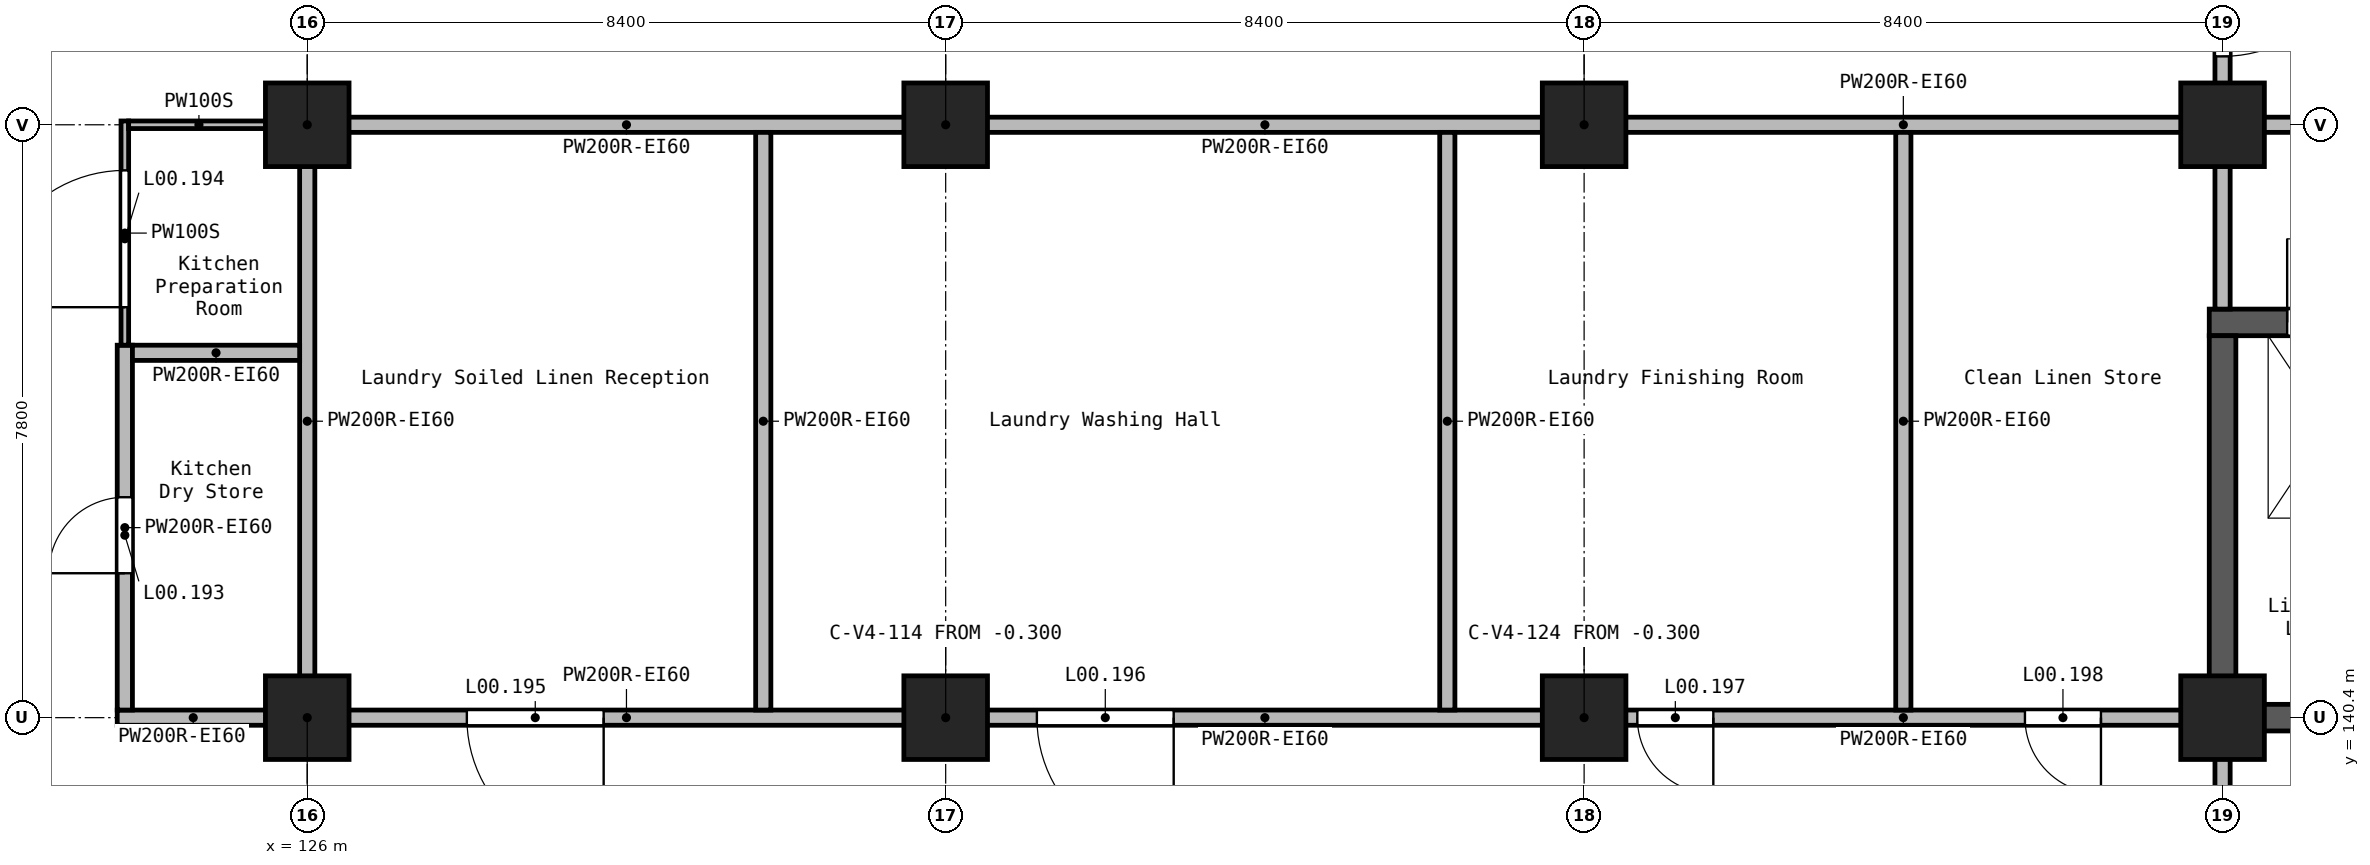
"""IFC4 building model, lengths in metres.
Left out: names, types, materials, properties, quantities, classifications, styles, units other than length and angle.
Written with IfcOpenShell. Run it as: python <this file> out.ifc"""

import sys

from ifc_helpers import new_model, si_unit, direction, frame, frame_2d, origin, origin_2d, place, context, subcontext, project, spatial, rectangle, extrude, element, fill, save


model = new_model("IFC4")
c1 = context("Model", 3, precision=1e-05, world=origin(), true_north=direction((0.0, 1.0)))
c2 = subcontext(c1, "Body", "Model", "MODEL_VIEW")
j1 = project(units=[si_unit("LENGTHUNIT", "METRE"), si_unit("PLANEANGLEUNIT", "RADIAN")], contexts=[c1])
p1 = place(None, origin())
s1 = spatial("IfcSite", under=j1, at=p1, CompositionType="ELEMENT")
p2 = place(p1, origin())
s2 = spatial("IfcBuilding", under=s1, at=p2, CompositionType="ELEMENT")
p3 = place(p2, origin())
s3 = spatial("IfcBuildingStorey", under=s2, at=p3, CompositionType="ELEMENT", Elevation=0.0)
for number, where, z_axis, x_axis in (
    (1, (126.0, 140.4, -0.3), (0.0, 0.0, 1.0), (1.0, 0.0, 0.0)),
    (2, (126.0, 148.2, -0.3), (0.0, 0.0, 1.0), (1.0, 0.0, 0.0)),
    (3, (134.4, 140.4, -0.3), (0.0, 0.0, 1.0), (1.0, 0.0, 0.0)),
    (4, (134.4, 148.2, -0.3), (0.0, 0.0, 1.0), (1.0, 0.0, 0.0)),
    (5, (142.8, 140.4, -0.3), (0.0, 0.0, 1.0), (1.0, 0.0, 0.0)),
    (6, (142.8, 148.2, -0.3), (0.0, 0.0, 1.0), (1.0, 0.0, 0.0)),
    (7, (151.2, 140.4, -0.3), (0.0, 0.0, 1.0), (1.0, 0.0, 0.0)),
    (8, (151.2, 148.2, -0.3), (0.0, 0.0, 1.0), (1.0, 0.0, 0.0)),
):
    element("IfcColumn", number, at=place(p3, frame(where, z_axis=z_axis, x_axis=x_axis)), inside=s3, PredefinedType="COLUMN", context=c2, shape_type="SweptSolid", body=[
        extrude(rectangle(XDim=1.1, YDim=1.1, at=origin_2d()), origin(), (0.0, 0.0, 1.0), 5.7),
    ])
p4 = place(p3, frame((151.025, 145.6, -0.3), z_axis=(0.0, 0.0, 1.0), x_axis=(1.0, 0.0, 0.0)))
e9 = element("IfcWall", 9, at=p4, inside=s3, PredefinedType="SHEAR", context=c2, shape_type="SweptSolid", body=[
    extrude(rectangle(XDim=2.975, YDim=0.35, at=frame_2d((1.488, 0.0))), origin(), (0.0, 0.0, 1.0), 5.7),
])
p5 = place(p4, frame((1.025, 0.0, 0.3)))
e10 = element("IfcOpeningElement", 10, at=p5, cuts=e9, PredefinedType="OPENING", context=c2, shape_type="SweptSolid", body=[
    extrude(rectangle(XDim=1.1, YDim=2.1, at=frame_2d((0.55, 1.05))), frame((0.0, 0.185, 0.0), z_axis=(0.0, -1.0, 0.0), x_axis=(1.0, 0.0, 0.0)), (0.0, 0.0, 1.0), 0.37),
])
p6 = place(p3, frame((151.2, 140.225, -0.3), z_axis=(0.0, 0.0, 1.0), x_axis=(0.0, 1.0, 0.0)))
e11 = element("IfcWall", 11, at=p6, inside=s3, PredefinedType="SHEAR", context=c2, shape_type="SweptSolid", body=[
    extrude(rectangle(XDim=5.2, YDim=0.35, at=frame_2d((2.6, 0.0))), origin(), (0.0, 0.0, 1.0), 5.7),
])
p7 = place(p3, frame((151.375, 140.4, -0.3), z_axis=(0.0, 0.0, 1.0), x_axis=(1.0, 0.0, 0.0)))
e12 = element("IfcWall", 12, at=p7, inside=s3, PredefinedType="SHEAR", context=c2, shape_type="SweptSolid", body=[
    extrude(rectangle(XDim=2.625, YDim=0.35, at=frame_2d((1.312, 0.0))), origin(), (0.0, 0.0, 1.0), 5.7),
])
p8 = place(p3, frame((150.7, 140.4, 0.0), z_axis=(0.0, 0.0, 1.0), x_axis=(-1.0, 0.0, 0.0)))
e13 = element("IfcWall", 13, at=p8, inside=s3, PredefinedType="SOLIDWALL", context=c2, shape_type="SweptSolid", body=[
    extrude(rectangle(XDim=7.4, YDim=0.2, at=frame_2d((3.7, 0.0))), origin(), (0.0, 0.0, 1.0), 5.05),
])
p9 = place(p8, frame((6.2, 0.0, 0.0)))
e14 = element("IfcOpeningElement", 14, at=p9, cuts=e13, PredefinedType="OPENING", context=c2, shape_type="SweptSolid", body=[
    extrude(rectangle(XDim=1.0, YDim=2.1, at=frame_2d((0.5, 1.05))), frame((0.0, 0.11, 0.0), z_axis=(0.0, -1.0, 0.0), x_axis=(1.0, 0.0, 0.0)), (0.0, 0.0, 1.0), 0.22),
])
p10 = place(p8, frame((1.1, 0.0, 0.0)))
e15 = element("IfcOpeningElement", 15, at=p10, cuts=e13, PredefinedType="OPENING", context=c2, shape_type="SweptSolid", body=[
    extrude(rectangle(XDim=1.0, YDim=2.1, at=frame_2d((0.5, 1.05))), frame((0.0, 0.11, 0.0), z_axis=(0.0, -1.0, 0.0), x_axis=(1.0, 0.0, 0.0)), (0.0, 0.0, 1.0), 0.22),
])
p11 = place(p3, frame((142.3, 140.4, 0.0), z_axis=(0.0, 0.0, 1.0), x_axis=(-1.0, 0.0, 0.0)))
e16 = element("IfcWall", 16, at=p11, inside=s3, PredefinedType="SOLIDWALL", context=c2, shape_type="SweptSolid", body=[
    extrude(rectangle(XDim=7.4, YDim=0.2, at=frame_2d((3.7, 0.0))), origin(), (0.0, 0.0, 1.0), 5.05),
])
p12 = place(p11, frame((4.9, 0.0, 0.0)))
e17 = element("IfcOpeningElement", 17, at=p12, cuts=e16, PredefinedType="OPENING", context=c2, shape_type="SweptSolid", body=[
    extrude(rectangle(XDim=1.8, YDim=2.1, at=frame_2d((0.9, 1.05))), frame((0.0, 0.11, 0.0), z_axis=(0.0, -1.0, 0.0), x_axis=(1.0, 0.0, 0.0)), (0.0, 0.0, 1.0), 0.22),
])
p13 = place(p3, frame((133.9, 140.4, 0.0), z_axis=(0.0, 0.0, 1.0), x_axis=(-1.0, 0.0, 0.0)))
e18 = element("IfcWall", 18, at=p13, inside=s3, PredefinedType="SOLIDWALL", context=c2, shape_type="SweptSolid", body=[
    extrude(rectangle(XDim=7.4, YDim=0.2, at=frame_2d((3.7, 0.0))), origin(), (0.0, 0.0, 1.0), 5.05),
])
p14 = place(p13, frame((4.0, 0.0, 0.0)))
e19 = element("IfcOpeningElement", 19, at=p14, cuts=e18, PredefinedType="OPENING", context=c2, shape_type="SweptSolid", body=[
    extrude(rectangle(XDim=1.8, YDim=2.1, at=frame_2d((0.9, 1.05))), frame((0.0, 0.11, 0.0), z_axis=(0.0, -1.0, 0.0), x_axis=(1.0, 0.0, 0.0)), (0.0, 0.0, 1.0), 0.22),
])
p15 = place(p3, frame((125.5, 140.4, 0.0), z_axis=(0.0, 0.0, 1.0), x_axis=(-1.0, 0.0, 0.0)))
e20 = element("IfcWall", 20, at=p15, inside=s3, PredefinedType="SOLIDWALL", context=c2, shape_type="SweptSolid", body=[
    extrude(rectangle(XDim=2.0, YDim=0.2, at=frame_2d((1.0, 0.0))), origin(), (0.0, 0.0, 1.0), 5.05),
])
p16 = place(p3, frame((151.2, 151.3, 0.0), z_axis=(0.0, 0.0, 1.0), x_axis=(0.0, -1.0, 0.0)))
e21 = element("IfcWall", 21, at=p16, inside=s3, PredefinedType="SOLIDWALL", context=c2, shape_type="SweptSolid", body=[
    extrude(rectangle(XDim=2.6, YDim=0.2, at=frame_2d((1.3, 0.0))), origin(), (0.0, 0.0, 1.0), 5.05),
])
p17 = place(p16, frame((0.4, 0.0, 0.0)))
e22 = element("IfcOpeningElement", 22, at=p17, cuts=e21, PredefinedType="OPENING", context=c2, shape_type="SweptSolid", body=[
    extrude(rectangle(XDim=1.8, YDim=2.1, at=frame_2d((0.9, 1.05))), frame((0.0, 0.11, 0.0), z_axis=(0.0, -1.0, 0.0), x_axis=(1.0, 0.0, 0.0)), (0.0, 0.0, 1.0), 0.22),
])
p18 = place(p3, frame((151.2, 147.7, 0.0), z_axis=(0.0, 0.0, 1.0), x_axis=(0.0, -1.0, 0.0)))
e23 = element("IfcWall", 23, at=p18, inside=s3, PredefinedType="SOLIDWALL", context=c2, shape_type="SweptSolid", body=[
    extrude(rectangle(XDim=1.925, YDim=0.2, at=frame_2d((0.962, 0.0))), origin(), (0.0, 0.0, 1.0), 5.05),
])
p19 = place(p3, frame((150.7, 148.2, 0.0), z_axis=(0.0, 0.0, 1.0), x_axis=(-1.0, 0.0, 0.0)))
e24 = element("IfcWall", 24, at=p19, inside=s3, PredefinedType="SOLIDWALL", context=c2, shape_type="SweptSolid", body=[
    extrude(rectangle(XDim=7.4, YDim=0.2, at=frame_2d((3.7, 0.0))), origin(), (0.0, 0.0, 1.0), 5.05),
])
p20 = place(p3, frame((142.3, 148.2, 0.0), z_axis=(0.0, 0.0, 1.0), x_axis=(-1.0, 0.0, 0.0)))
e25 = element("IfcWall", 25, at=p20, inside=s3, PredefinedType="SOLIDWALL", context=c2, shape_type="SweptSolid", body=[
    extrude(rectangle(XDim=7.4, YDim=0.2, at=frame_2d((3.7, 0.0))), origin(), (0.0, 0.0, 1.0), 5.05),
])
p21 = place(p3, frame((133.9, 148.2, 0.0), z_axis=(0.0, 0.0, 1.0), x_axis=(-1.0, 0.0, 0.0)))
e26 = element("IfcWall", 26, at=p21, inside=s3, PredefinedType="SOLIDWALL", context=c2, shape_type="SweptSolid", body=[
    extrude(rectangle(XDim=7.4, YDim=0.2, at=frame_2d((3.7, 0.0))), origin(), (0.0, 0.0, 1.0), 5.05),
])
p22 = place(p3, frame((151.7, 148.2, 0.0), z_axis=(0.0, 0.0, 1.0), x_axis=(1.0, 0.0, 0.0)))
e27 = element("IfcWall", 27, at=p22, inside=s3, PredefinedType="SOLIDWALL", context=c2, shape_type="SweptSolid", body=[
    extrude(rectangle(XDim=7.4, YDim=0.2, at=frame_2d((3.7, 0.0))), origin(), (0.0, 0.0, 1.0), 5.05),
])
p23 = place(p22, frame((2.8, 0.0, 0.0)))
e28 = element("IfcOpeningElement", 28, at=p23, cuts=e27, PredefinedType="OPENING", context=c2, shape_type="SweptSolid", body=[
    extrude(rectangle(XDim=1.8, YDim=2.1, at=frame_2d((0.9, 1.05))), frame((0.0, 0.11, 0.0), z_axis=(0.0, -1.0, 0.0), x_axis=(1.0, 0.0, 0.0)), (0.0, 0.0, 1.0), 0.22),
])
p24 = place(p3, frame((126.0, 140.9, 0.0), z_axis=(0.0, 0.0, 1.0), x_axis=(0.0, 1.0, 0.0)))
e29 = element("IfcWall", 29, at=p24, inside=s3, PredefinedType="SOLIDWALL", context=c2, shape_type="SweptSolid", body=[
    extrude(rectangle(XDim=6.8, YDim=0.2, at=frame_2d((3.4, 0.0))), origin(), (0.0, 0.0, 1.0), 5.05),
])
for number, where, z_axis, x_axis in (
    (30, (132.0, 140.5, 0.0), (0.0, 0.0, 1.0), (0.0, 1.0, 0.0)),
    (31, (141.0, 140.5, 0.0), (0.0, 0.0, 1.0), (0.0, 1.0, 0.0)),
    (32, (147.0, 140.5, 0.0), (0.0, 0.0, 1.0), (0.0, 1.0, 0.0)),
):
    element("IfcWall", number, at=place(p3, frame(where, z_axis=z_axis, x_axis=x_axis)), inside=s3, PredefinedType="SOLIDWALL", context=c2, shape_type="SweptSolid", body=[
        extrude(rectangle(XDim=7.6, YDim=0.2, at=frame_2d((3.8, 0.0))), origin(), (0.0, 0.0, 1.0), 5.05),
    ])
p25 = place(p3, frame((123.6, 140.5, 0.0), z_axis=(0.0, 0.0, 1.0), x_axis=(0.0, 1.0, 0.0)))
e33 = element("IfcWall", 33, at=p25, inside=s3, PredefinedType="SOLIDWALL", context=c2, shape_type="SweptSolid", body=[
    extrude(rectangle(XDim=4.8, YDim=0.2, at=frame_2d((2.4, 0.0))), origin(), (0.0, 0.0, 1.0), 5.05),
])
p26 = place(p25, frame((1.8, 0.0, 0.0)))
e34 = element("IfcOpeningElement", 34, at=p26, cuts=e33, PredefinedType="OPENING", context=c2, shape_type="SweptSolid", body=[
    extrude(rectangle(XDim=1.0, YDim=2.1, at=frame_2d((0.5, 1.05))), frame((0.0, 0.11, 0.0), z_axis=(0.0, -1.0, 0.0), x_axis=(1.0, 0.0, 0.0)), (0.0, 0.0, 1.0), 0.22),
])
p27 = place(p3, frame((151.2, 137.25, 0.0), z_axis=(0.0, 0.0, 1.0), x_axis=(0.0, 1.0, 0.0)))
e35 = element("IfcWall", 35, at=p27, inside=s3, PredefinedType="SOLIDWALL", context=c2, shape_type="SweptSolid", body=[
    extrude(rectangle(XDim=2.65, YDim=0.2, at=frame_2d((1.325, 0.0))), origin(), (0.0, 0.0, 1.0), 5.05),
])
p28 = place(p3, frame((123.7, 145.2, 0.0), z_axis=(0.0, 0.0, 1.0), x_axis=(1.0, 0.0, 0.0)))
e36 = element("IfcWall", 36, at=p28, inside=s3, PredefinedType="SOLIDWALL", context=c2, shape_type="SweptSolid", body=[
    extrude(rectangle(XDim=2.2, YDim=0.2, at=frame_2d((1.1, 0.0))), origin(), (0.0, 0.0, 1.0), 5.05),
])
p29 = place(p3, frame((123.6, 145.3, 0.0), z_axis=(0.0, 0.0, 1.0), x_axis=(0.0, 1.0, 0.0)))
e37 = element("IfcWall", 37, at=p29, inside=s3, PredefinedType="PARTITIONING", context=c2, shape_type="SweptSolid", body=[
    extrude(rectangle(XDim=2.95, YDim=0.1, at=frame_2d((1.475, 0.0))), origin(), (0.0, 0.0, 1.0), 5.05),
])
p30 = place(p29, frame((0.5, 0.0, 0.0)))
e38 = element("IfcOpeningElement", 38, at=p30, cuts=e37, PredefinedType="OPENING", context=c2, shape_type="SweptSolid", body=[
    extrude(rectangle(XDim=1.8, YDim=2.1, at=frame_2d((0.9, 1.05))), frame((0.0, 0.06, 0.0), z_axis=(0.0, -1.0, 0.0), x_axis=(1.0, 0.0, 0.0)), (0.0, 0.0, 1.0), 0.12),
])
p31 = place(p3, frame((123.65, 148.2, 0.0), z_axis=(0.0, 0.0, 1.0), x_axis=(1.0, 0.0, 0.0)))
e39 = element("IfcWall", 39, at=p31, inside=s3, PredefinedType="PARTITIONING", context=c2, shape_type="SweptSolid", body=[
    extrude(rectangle(XDim=1.85, YDim=0.1, at=frame_2d((0.925, 0.0))), origin(), (0.0, 0.0, 1.0), 5.05),
])
p32 = place(p17, frame((1.8, 0.0, 0.0), z_axis=(0.0, 0.0, 1.0), x_axis=(-1.0, 0.0, 0.0)))
e40 = element("IfcDoor", 40, at=p32, inside=s3, OperationType="DOUBLE_DOOR_SINGLE_SWING", PredefinedType="DOOR", context=c2, shape_type="SweptSolid", body=[
    extrude(rectangle(XDim=1.8, YDim=2.1, at=frame_2d((0.9, 1.05))), frame((0.0, 0.025, 0.0), z_axis=(0.0, -1.0, 0.0), x_axis=(1.0, 0.0, 0.0)), (0.0, 0.0, 1.0), 0.05),
])
fill(e22, e40)
p33 = place(p26, frame((1.0, 0.0, 0.0), z_axis=(0.0, 0.0, 1.0), x_axis=(-1.0, 0.0, 0.0)))
e41 = element("IfcDoor", 41, at=p33, inside=s3, OperationType="SINGLE_SWING_RIGHT", PredefinedType="DOOR", context=c2, shape_type="SweptSolid", body=[
    extrude(rectangle(XDim=1.0, YDim=2.1, at=frame_2d((0.5, 1.05))), frame((0.0, 0.025, 0.0), z_axis=(0.0, -1.0, 0.0), x_axis=(1.0, 0.0, 0.0)), (0.0, 0.0, 1.0), 0.05),
])
fill(e34, e41)
p34 = place(p30, frame((1.8, 0.0, 0.0), z_axis=(0.0, 0.0, 1.0), x_axis=(-1.0, 0.0, 0.0)))
e42 = element("IfcDoor", 42, at=p34, inside=s3, OperationType="DOUBLE_DOOR_SINGLE_SWING", PredefinedType="DOOR", context=c2, shape_type="SweptSolid", body=[
    extrude(rectangle(XDim=1.8, YDim=2.1, at=frame_2d((0.9, 1.05))), frame((0.0, 0.025, 0.0), z_axis=(0.0, -1.0, 0.0), x_axis=(1.0, 0.0, 0.0)), (0.0, 0.0, 1.0), 0.05),
])
fill(e38, e42)
p35 = place(p14, frame((1.8, 0.0, 0.0), z_axis=(0.0, 0.0, 1.0), x_axis=(-1.0, 0.0, 0.0)))
e43 = element("IfcDoor", 43, at=p35, inside=s3, OperationType="DOUBLE_DOOR_SINGLE_SWING", PredefinedType="DOOR", context=c2, shape_type="SweptSolid", body=[
    extrude(rectangle(XDim=1.8, YDim=2.1, at=frame_2d((0.9, 1.05))), frame((0.0, 0.025, 0.0), z_axis=(0.0, -1.0, 0.0), x_axis=(1.0, 0.0, 0.0)), (0.0, 0.0, 1.0), 0.05),
])
fill(e19, e43)
p36 = place(p12, frame((1.8, 0.0, 0.0), z_axis=(0.0, 0.0, 1.0), x_axis=(-1.0, 0.0, 0.0)))
e44 = element("IfcDoor", 44, at=p36, inside=s3, OperationType="DOUBLE_DOOR_SINGLE_SWING", PredefinedType="DOOR", context=c2, shape_type="SweptSolid", body=[
    extrude(rectangle(XDim=1.8, YDim=2.1, at=frame_2d((0.9, 1.05))), frame((0.0, 0.025, 0.0), z_axis=(0.0, -1.0, 0.0), x_axis=(1.0, 0.0, 0.0)), (0.0, 0.0, 1.0), 0.05),
])
fill(e17, e44)
p37 = place(p9, frame((1.0, 0.0, 0.0), z_axis=(0.0, 0.0, 1.0), x_axis=(-1.0, 0.0, 0.0)))
e45 = element("IfcDoor", 45, at=p37, inside=s3, OperationType="SINGLE_SWING_LEFT", PredefinedType="DOOR", context=c2, shape_type="SweptSolid", body=[
    extrude(rectangle(XDim=1.0, YDim=2.1, at=frame_2d((0.5, 1.05))), frame((0.0, 0.025, 0.0), z_axis=(0.0, -1.0, 0.0), x_axis=(1.0, 0.0, 0.0)), (0.0, 0.0, 1.0), 0.05),
])
fill(e14, e45)
p38 = place(p10, frame((1.0, 0.0, 0.0), z_axis=(0.0, 0.0, 1.0), x_axis=(-1.0, 0.0, 0.0)))
e46 = element("IfcDoor", 46, at=p38, inside=s3, OperationType="SINGLE_SWING_RIGHT", PredefinedType="DOOR", context=c2, shape_type="SweptSolid", body=[
    extrude(rectangle(XDim=1.0, YDim=2.1, at=frame_2d((0.5, 1.05))), frame((0.0, 0.025, 0.0), z_axis=(0.0, -1.0, 0.0), x_axis=(1.0, 0.0, 0.0)), (0.0, 0.0, 1.0), 0.05),
])
fill(e15, e46)
p39 = place(p5, origin())
e47 = element("IfcDoor", 47, at=p39, inside=s3, OperationType="DOUBLE_DOOR_SLIDING", PredefinedType="DOOR", context=c2, shape_type="SweptSolid", body=[
    extrude(rectangle(XDim=1.1, YDim=2.1, at=frame_2d((0.55, 1.05))), frame((0.0, 0.025, 0.0), z_axis=(0.0, -1.0, 0.0), x_axis=(1.0, 0.0, 0.0)), (0.0, 0.0, 1.0), 0.05),
])
fill(e10, e47)
save(model, sys.argv[1])
